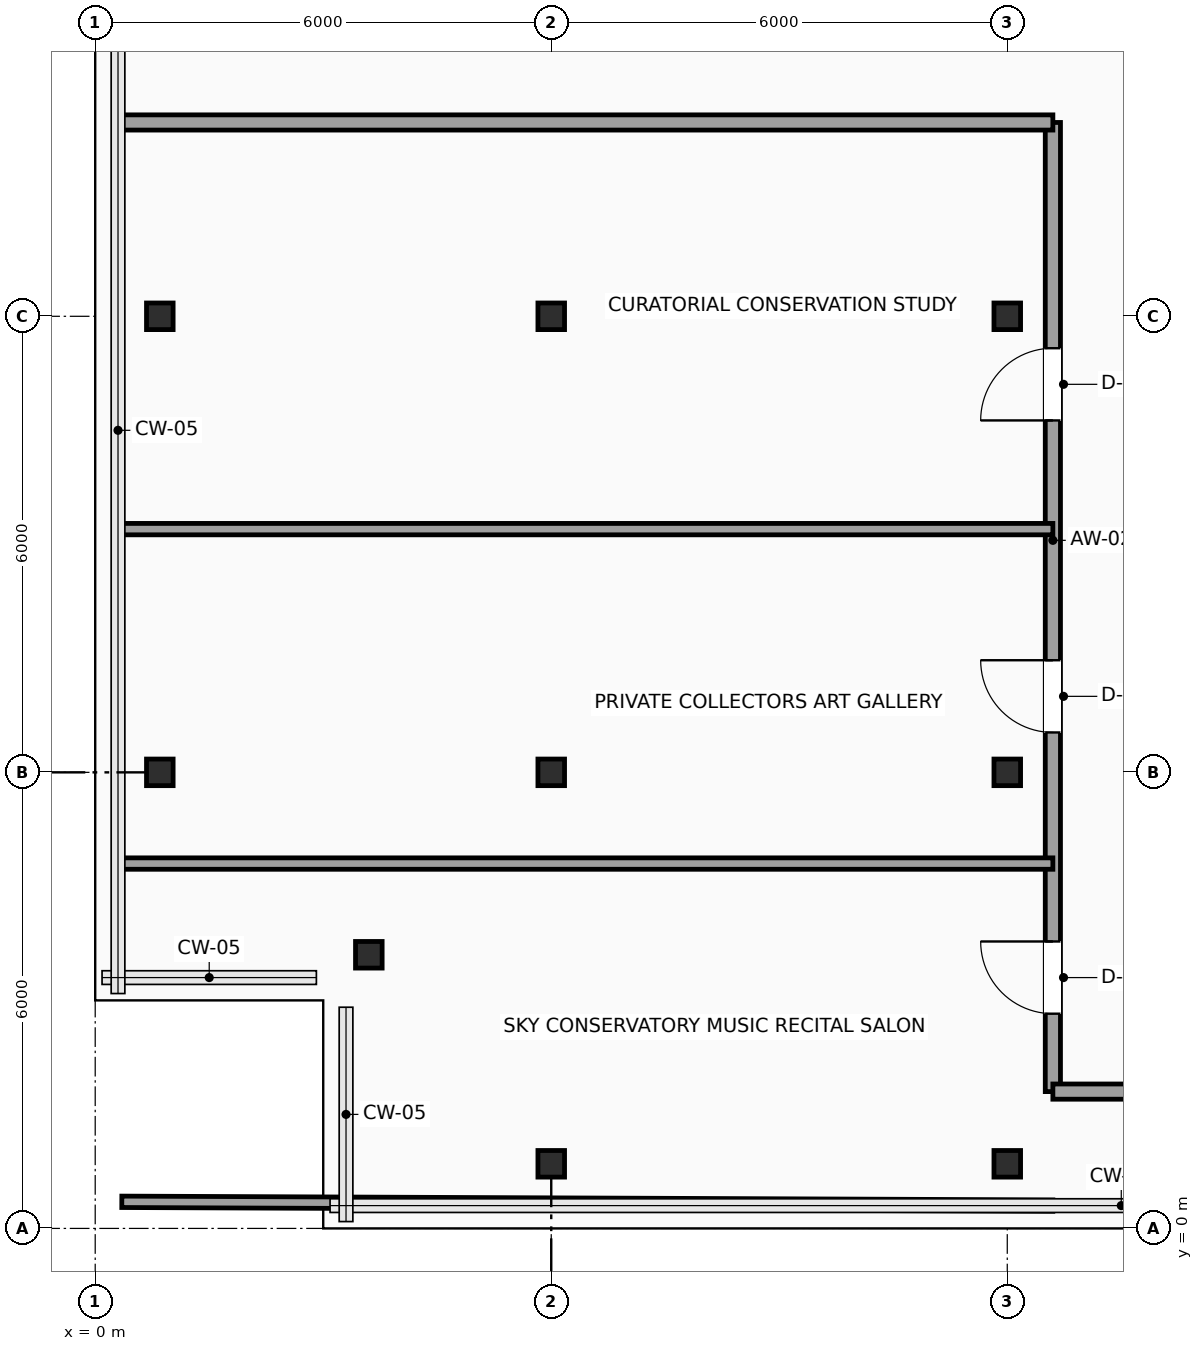
"""IFC4 building model, lengths in metres.
Left out: names, types, materials, properties, quantities, classifications, styles, units other than length and angle.
Written with IfcOpenShell. Run it as: python <this file> out.ifc"""

import sys

from ifc_helpers import new_model, si_unit, direction, frame, frame_2d, origin, origin_2d, place, context, subcontext, project, spatial, rectangle, hollow_rectangle, extrude, element, fill, save


model = new_model("IFC4")
c1 = context("Model", 3, precision=1e-05, world=origin(), true_north=direction((0.0, 1.0)))
c2 = subcontext(c1, "Body", "Model", "MODEL_VIEW")
j1 = project(units=[si_unit("LENGTHUNIT", "METRE"), si_unit("PLANEANGLEUNIT", "RADIAN")], contexts=[c1])
p1 = place(None, origin())
s1 = spatial("IfcSite", under=j1, at=p1, CompositionType="ELEMENT")
p2 = place(p1, origin())
s2 = spatial("IfcBuilding", under=s1, at=p2, CompositionType="ELEMENT")
p3 = place(p2, frame((0.0, 0.0, 271.2)))
s3 = spatial("IfcBuildingStorey", under=s2, at=p3, CompositionType="ELEMENT", Elevation=271.2)
for number, where, z_axis, x_axis in (
    (1, (3.6, 3.6, 0.0), (0.0, 0.0, 1.0), (1.0, 0.0, 0.0)),
    (2, (0.85, 6.0, 0.0), (0.0, 0.0, 1.0), (1.0, 0.0, 0.0)),
    (3, (0.85, 12.0, 0.0), (0.0, 0.0, 1.0), (1.0, 0.0, 0.0)),
    (4, (6.0, 0.85, 0.0), (0.0, 0.0, 1.0), (1.0, 0.0, 0.0)),
    (5, (6.0, 6.0, 0.0), (0.0, 0.0, 1.0), (1.0, 0.0, 0.0)),
    (6, (6.0, 12.0, 0.0), (0.0, 0.0, 1.0), (1.0, 0.0, 0.0)),
    (7, (12.0, 0.85, 0.0), (0.0, 0.0, 1.0), (1.0, 0.0, 0.0)),
    (8, (12.0, 6.0, 0.0), (0.0, 0.0, 1.0), (1.0, 0.0, 0.0)),
    (9, (12.0, 12.0, 0.0), (0.0, 0.0, 1.0), (1.0, 0.0, 0.0)),
):
    element("IfcColumn", number, at=place(p3, frame(where, z_axis=z_axis, x_axis=x_axis)), inside=s3, PredefinedType="COLUMN", context=c2, shape_type="SweptSolid", body=[
        extrude(hollow_rectangle(XDim=0.35, YDim=0.35, WallThickness=0.016, InnerFilletRadius=0.016, OuterFilletRadius=0.032, at=origin_2d()), origin(), (0.0, 0.0, 1.0), 3.5),
    ])
p4 = place(p3, frame((12.6, 1.8, 0.0), z_axis=(0.0, 0.0, 1.0), x_axis=(0.0, 1.0, 0.0)))
e10 = element("IfcWall", 10, at=p4, inside=s3, PredefinedType="PARTITIONING", context=c2, shape_type="SweptSolid", body=[
    extrude(rectangle(XDim=12.75, YDim=0.2, at=frame_2d((6.375, 0.0))), origin(), (0.0, 0.0, 1.0), 3.3),
])
p5 = place(p4, frame((1.025, 0.0, 0.0)))
e11 = element("IfcOpeningElement", 11, at=p5, cuts=e10, PredefinedType="OPENING", context=c2, shape_type="SweptSolid", body=[
    extrude(rectangle(XDim=0.95, YDim=2.15, at=frame_2d((0.475, 1.075))), frame((0.0, 0.11, 0.0), z_axis=(0.0, -1.0, 0.0), x_axis=(1.0, 0.0, 0.0)), (0.0, 0.0, 1.0), 0.22),
])
p6 = place(p4, frame((4.725, 0.0, 0.0)))
e12 = element("IfcOpeningElement", 12, at=p6, cuts=e10, PredefinedType="OPENING", context=c2, shape_type="SweptSolid", body=[
    extrude(rectangle(XDim=0.95, YDim=2.15, at=frame_2d((0.475, 1.075))), frame((0.0, 0.11, 0.0), z_axis=(0.0, -1.0, 0.0), x_axis=(1.0, 0.0, 0.0)), (0.0, 0.0, 1.0), 0.22),
])
p7 = place(p4, frame((8.83, 0.0, 0.0)))
e13 = element("IfcOpeningElement", 13, at=p7, cuts=e10, PredefinedType="OPENING", context=c2, shape_type="SweptSolid", body=[
    extrude(rectangle(XDim=0.95, YDim=2.15, at=frame_2d((0.475, 1.075))), frame((0.0, 0.11, 0.0), z_axis=(0.0, -1.0, 0.0), x_axis=(1.0, 0.0, 0.0)), (0.0, 0.0, 1.0), 0.22),
])
p8 = place(p3, frame((12.6, 14.55, 0.0), z_axis=(0.0, 0.0, 1.0), x_axis=(-1.0, 0.0, 0.0)))
e14 = element("IfcWall", 14, at=p8, inside=s3, PredefinedType="PARTITIONING", context=c2, shape_type="SweptSolid", body=[
    extrude(rectangle(XDim=12.3, YDim=0.2, at=frame_2d((6.15, 0.0))), origin(), (0.0, 0.0, 1.0), 3.3),
])
p9 = place(p3, frame((14.95, 1.8, 0.0), z_axis=(0.0, 0.0, 1.0), x_axis=(-1.0, 0.0, 0.0)))
e15 = element("IfcWall", 15, at=p9, inside=s3, PredefinedType="PARTITIONING", context=c2, shape_type="SweptSolid", body=[
    extrude(rectangle(XDim=2.35, YDim=0.2, at=frame_2d((1.175, 0.0))), origin(), (0.0, 0.0, 1.0), 3.3),
])
p10 = place(p3, frame((0.35, 0.35, 0.0), z_axis=(0.0, 0.0, 1.0), x_axis=(0.999991653965, -0.004085584524, 0.0)))
e16 = element("IfcWall", 16, at=p10, inside=s3, PredefinedType="PARTITIONING", context=c2, shape_type="SweptSolid", body=[
    extrude(rectangle(XDim=12.25, YDim=0.15, at=frame_2d((6.125, 0.0))), origin(), (0.0, 0.0, 1.0), 3.3),
])
p11 = place(p3, frame((0.3, 4.8, 0.0), z_axis=(0.0, 0.0, 1.0), x_axis=(1.0, 0.0, 0.0)))
e17 = element("IfcWall", 17, at=p11, inside=s3, PredefinedType="PARTITIONING", context=c2, shape_type="SweptSolid", body=[
    extrude(rectangle(XDim=12.3, YDim=0.15, at=frame_2d((6.15, 0.0))), origin(), (0.0, 0.0, 1.0), 3.3),
])
p12 = place(p3, frame((0.3, 9.2, 0.0), z_axis=(0.0, 0.0, 1.0), x_axis=(1.0, 0.0, 0.0)))
e18 = element("IfcWall", 18, at=p12, inside=s3, PredefinedType="PARTITIONING", context=c2, shape_type="SweptSolid", body=[
    extrude(rectangle(XDim=12.3, YDim=0.15, at=frame_2d((6.15, 0.0))), origin(), (0.0, 0.0, 1.0), 2.932),
])
p13 = place(p5, origin())
e19 = element("IfcDoor", 19, at=p13, inside=s3, OperationType="SINGLE_SWING_RIGHT", PredefinedType="DOOR", context=c2, shape_type="SweptSolid", body=[
    extrude(rectangle(XDim=0.95, YDim=2.15, at=frame_2d((0.475, 1.075))), frame((0.0, 0.025, 0.0), z_axis=(0.0, -1.0, 0.0), x_axis=(1.0, 0.0, 0.0)), (0.0, 0.0, 1.0), 0.05),
])
fill(e11, e19)
p14 = place(p6, origin())
e20 = element("IfcDoor", 20, at=p14, inside=s3, OperationType="SINGLE_SWING_RIGHT", PredefinedType="DOOR", context=c2, shape_type="SweptSolid", body=[
    extrude(rectangle(XDim=0.95, YDim=2.15, at=frame_2d((0.475, 1.075))), frame((0.0, 0.025, 0.0), z_axis=(0.0, -1.0, 0.0), x_axis=(1.0, 0.0, 0.0)), (0.0, 0.0, 1.0), 0.05),
])
fill(e12, e20)
p15 = place(p7, origin())
e21 = element("IfcDoor", 21, at=p15, inside=s3, OperationType="SINGLE_SWING_LEFT", PredefinedType="DOOR", context=c2, shape_type="SweptSolid", body=[
    extrude(rectangle(XDim=0.95, YDim=2.15, at=frame_2d((0.475, 1.075))), frame((0.0, 0.025, 0.0), z_axis=(0.0, -1.0, 0.0), x_axis=(1.0, 0.0, 0.0)), (0.0, 0.0, 1.0), 0.05),
])
fill(e13, e21)
save(model, sys.argv[1])
